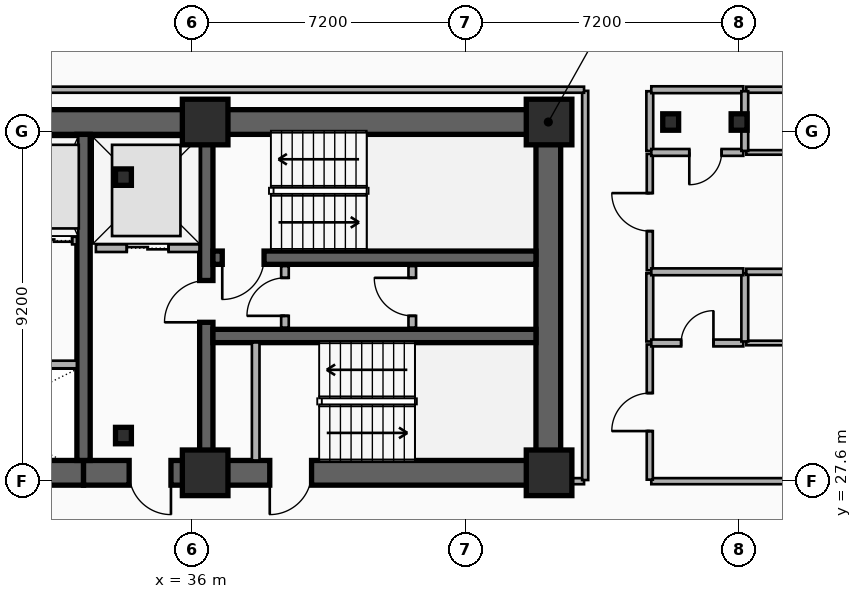
"""IFC4 building model, lengths in metres.
Left out: names, types, materials, properties, quantities, classifications, styles, units other than length and angle.
Written with IfcOpenShell. Run it as: python <this file> out.ifc"""

import sys

from ifc_helpers import new_model, si_unit, direction, frame, frame_2d, origin, origin_2d, place, context, subcontext, project, spatial, rectangle, i_section, extrude, element, fill, save


model = new_model("IFC4")
c1 = context("Model", 3, precision=1e-05, world=origin(), true_north=direction((0.0, 1.0)))
c2 = subcontext(c1, "Body", "Model", "MODEL_VIEW")
j1 = project(units=[si_unit("LENGTHUNIT", "METRE"), si_unit("PLANEANGLEUNIT", "RADIAN")], contexts=[c1])
p1 = place(None, origin())
s1 = spatial("IfcSite", under=j1, at=p1, CompositionType="ELEMENT")
p2 = place(p1, origin())
s2 = spatial("IfcBuilding", under=s1, at=p2, CompositionType="ELEMENT")
p3 = place(p2, frame((0.0, 0.0, 101.3)))
s3 = spatial("IfcBuildingStorey", under=s2, at=p3, CompositionType="ELEMENT", Elevation=101.3)
p4 = place(p3, frame((12.15, 37.05, 0.0), z_axis=(0.0, 0.0, 1.0), x_axis=(1.0, 0.0, 0.0)))
e1 = element("IfcWall", 1, at=p4, inside=s3, PredefinedType="SHEAR", context=c2, shape_type="SweptSolid", body=[
    extrude(rectangle(XDim=33.23, YDim=0.65, at=frame_2d((16.615, 0.0))), origin(), (0.0, 0.0, 1.0), 3.5),
])
p5 = place(p3, frame((33.15, 27.82, 0.0), z_axis=(0.0, 0.0, 1.0), x_axis=(-1.0, 0.0, 0.0)))
e2 = element("IfcWall", 2, at=p5, inside=s3, PredefinedType="SHEAR", context=c2, shape_type="SweptSolid", body=[
    extrude(rectangle(XDim=11.97, YDim=0.65, at=frame_2d((5.985, 0.0))), origin(), (0.0, 0.0, 1.0), 3.5),
])
p6 = place(p5, frame((6.1, 0.0, 0.0)))
e3 = element("IfcOpeningElement", 3, at=p6, cuts=e2, PredefinedType="OPENING", context=c2, shape_type="SweptSolid", body=[
    extrude(rectangle(XDim=1.6, YDim=2.2, at=frame_2d((0.8, 1.1))), frame((0.0, 0.335, 0.0), z_axis=(0.0, -1.0, 0.0), x_axis=(1.0, 0.0, 0.0)), (0.0, 0.0, 1.0), 0.67),
])
p7 = place(p3, frame((45.38, 27.82, 0.0), z_axis=(0.0, 0.0, 1.0), x_axis=(-1.0, 0.0, 0.0)))
e4 = element("IfcWall", 4, at=p7, inside=s3, PredefinedType="SHEAR", context=c2, shape_type="SweptSolid", body=[
    extrude(rectangle(XDim=12.23, YDim=0.65, at=frame_2d((6.115, 0.0))), origin(), (0.0, 0.0, 1.0), 3.5),
])
p8 = place(p7, frame((9.93, 0.0, 0.0)))
e5 = element("IfcOpeningElement", 5, at=p8, cuts=e4, PredefinedType="OPENING", context=c2, shape_type="SweptSolid", body=[
    extrude(rectangle(XDim=1.1, YDim=2.15, at=frame_2d((0.55, 1.075))), frame((0.0, 0.335, 0.0), z_axis=(0.0, -1.0, 0.0), x_axis=(1.0, 0.0, 0.0)), (0.0, 0.0, 1.0), 0.67),
])
p9 = place(p7, frame((6.23, 0.0, 0.0)))
e6 = element("IfcOpeningElement", 6, at=p9, cuts=e4, PredefinedType="OPENING", context=c2, shape_type="SweptSolid", body=[
    extrude(rectangle(XDim=1.1, YDim=2.15, at=frame_2d((0.55, 1.075))), frame((0.0, 0.335, 0.0), z_axis=(0.0, -1.0, 0.0), x_axis=(1.0, 0.0, 0.0)), (0.0, 0.0, 1.0), 0.67),
])
p10 = place(p3, frame((45.38, 28.145, 0.0), z_axis=(0.0, 0.0, 1.0), x_axis=(0.0, 1.0, 0.0)))
e7 = element("IfcWall", 7, at=p10, inside=s3, PredefinedType="SHEAR", context=c2, shape_type="SweptSolid", body=[
    extrude(rectangle(XDim=8.58, YDim=0.65, at=frame_2d((4.29, 0.0))), origin(), (0.0, 0.0, 1.0), 3.5),
])
p11 = place(p3, frame((33.15, 28.145, 0.0), z_axis=(0.0, 0.0, 1.0), x_axis=(0.0, 1.0, 0.0)))
e8 = element("IfcWall", 8, at=p11, inside=s3, PredefinedType="SHEAR", context=c2, shape_type="SweptSolid", body=[
    extrude(rectangle(XDim=8.58, YDim=0.35, at=frame_2d((4.29, 0.0))), origin(), (0.0, 0.0, 1.0), 3.5),
])
p12 = place(p3, frame((36.38, 28.145, 0.0), z_axis=(0.0, 0.0, 1.0), x_axis=(0.0, 1.0, 0.0)))
e9 = element("IfcWall", 9, at=p12, inside=s3, PredefinedType="SHEAR", context=c2, shape_type="SweptSolid", body=[
    extrude(rectangle(XDim=8.58, YDim=0.35, at=frame_2d((4.29, 0.0))), origin(), (0.0, 0.0, 1.0), 3.5),
])
p13 = place(p12, frame((3.635, 0.0, 0.0)))
e10 = element("IfcOpeningElement", 10, at=p13, cuts=e9, PredefinedType="OPENING", context=c2, shape_type="SweptSolid", body=[
    extrude(rectangle(XDim=1.1, YDim=2.15, at=frame_2d((0.55, 1.075))), frame((0.0, 0.185, 0.0), z_axis=(0.0, -1.0, 0.0), x_axis=(1.0, 0.0, 0.0)), (0.0, 0.0, 1.0), 0.37),
])
p14 = place(p3, frame((45.055, 33.48, 0.0), z_axis=(0.0, 0.0, 1.0), x_axis=(-1.0, 0.0, 0.0)))
e11 = element("IfcWall", 11, at=p14, inside=s3, PredefinedType="SHEAR", context=c2, shape_type="SweptSolid", body=[
    extrude(rectangle(XDim=8.5, YDim=0.35, at=frame_2d((4.25, 0.0))), origin(), (0.0, 0.0, 1.0), 3.5),
])
p15 = place(p14, frame((7.155, 0.0, 0.0)))
e12 = element("IfcOpeningElement", 12, at=p15, cuts=e11, PredefinedType="OPENING", context=c2, shape_type="SweptSolid", body=[
    extrude(rectangle(XDim=1.1, YDim=2.15, at=frame_2d((0.55, 1.075))), frame((0.0, 0.185, 0.0), z_axis=(0.0, -1.0, 0.0), x_axis=(1.0, 0.0, 0.0)), (0.0, 0.0, 1.0), 0.37),
])
p16 = place(p3, frame((36.555, 31.42, 0.0), z_axis=(0.0, 0.0, 1.0), x_axis=(1.0, 0.0, 0.0)))
e13 = element("IfcWall", 13, at=p16, inside=s3, PredefinedType="SHEAR", context=c2, shape_type="SweptSolid", body=[
    extrude(rectangle(XDim=8.5, YDim=0.35, at=frame_2d((4.25, 0.0))), origin(), (0.0, 0.0, 1.0), 3.5),
])
for number, where, z_axis, x_axis in (
    (14, (34.2, 28.8, 0.0), (0.0, 0.0, 1.0), (1.0, 0.0, 0.0)),
    (15, (34.2, 35.6, 0.0), (0.0, 0.0, 1.0), (1.0, 0.0, 0.0)),
):
    element("IfcColumn", number, at=place(p3, frame(where, z_axis=z_axis, x_axis=x_axis)), inside=s3, PredefinedType="COLUMN", context=c2, shape_type="SweptSolid", body=[
        extrude(i_section(OverallWidth=0.418, OverallDepth=0.432, WebThickness=0.035, FlangeThickness=0.056, FilletRadius=0.015, at=origin_2d()), origin(), (0.0, 0.0, 1.0), 3.5),
    ])
for number, where, z_axis, x_axis in (
    (16, (36.35, 27.82, 0.0), (0.0, 0.0, 1.0), (1.0, 0.0, 0.0)),
    (17, (36.35, 37.05, 0.0), (0.0, 0.0, 1.0), (1.0, 0.0, 0.0)),
    (18, (45.4, 27.82, 0.0), (0.0, 0.0, 1.0), (1.0, 0.0, 0.0)),
    (19, (45.4, 37.05, 0.0), (0.0, 0.0, 1.0), (1.0, 0.0, 0.0)),
):
    element("IfcColumn", number, at=place(p3, frame(where, z_axis=z_axis, x_axis=x_axis)), inside=s3, PredefinedType="COLUMN", context=c2, shape_type="SweptSolid", body=[
        extrude(rectangle(XDim=1.2, YDim=1.2, at=origin_2d()), origin(), (0.0, 0.0, 1.0), 3.5),
    ])
for number, where, z_axis, x_axis in (
    (20, (48.6, 37.05, 0.0), (0.0, 0.0, 1.0), (1.0, 0.0, 0.0)),
    (21, (50.4, 37.05, 0.0), (0.0, 0.0, 1.0), (1.0, 0.0, 0.0)),
):
    element("IfcColumn", number, at=place(p3, frame(where, z_axis=z_axis, x_axis=x_axis)), inside=s3, PredefinedType="COLUMN", context=c2, shape_type="SweptSolid", body=[
        extrude(i_section(OverallWidth=0.418, OverallDepth=0.432, WebThickness=0.035, FlangeThickness=0.056, FilletRadius=0.015, at=origin_2d()), origin(), (0.0, 0.0, 1.0), 3.5),
    ])
p17 = place(p3, frame((33.475, 33.73, 0.0), z_axis=(0.0, 0.0, 1.0), x_axis=(1.0, 0.0, 0.0)))
e22 = element("IfcWall", 22, at=p17, inside=s3, PredefinedType="PARTITIONING", context=c2, shape_type="SweptSolid", body=[
    extrude(rectangle(XDim=2.725, YDim=0.2, at=frame_2d((1.362, 0.0))), origin(), (0.0, 0.0, 1.0), 2.212),
])
p18 = place(p17, frame((0.812, 0.0, 0.0)))
e23 = element("IfcOpeningElement", 23, at=p18, cuts=e22, PredefinedType="OPENING", context=c2, shape_type="SweptSolid", body=[
    extrude(rectangle(XDim=1.1, YDim=2.15, at=frame_2d((0.55, 1.075))), frame((0.0, 0.11, 0.0), z_axis=(0.0, -1.0, 0.0), x_axis=(1.0, 0.0, 0.0)), (0.0, 0.0, 1.0), 0.22),
])
p19 = place(p3, frame((31.775, 30.67, 0.0), z_axis=(0.0, 0.0, 1.0), x_axis=(1.0, 0.0, 0.0)))
e24 = element("IfcWall", 24, at=p19, inside=s3, PredefinedType="PARTITIONING", context=c2, shape_type="SweptSolid", body=[
    extrude(rectangle(XDim=1.2, YDim=0.2, at=frame_2d((0.6, 0.0))), origin(), (0.0, 0.0, 1.0), 2.62),
])
p20 = place(p3, frame((31.775, 33.93, 0.0), z_axis=(0.0, 0.0, 1.0), x_axis=(1.0, 0.0, 0.0)))
e25 = element("IfcWall", 25, at=p20, inside=s3, PredefinedType="PARTITIONING", context=c2, shape_type="SweptSolid", body=[
    extrude(rectangle(XDim=1.2, YDim=0.2, at=frame_2d((0.6, 0.0))), origin(), (0.0, 0.0, 1.0), 3.24),
])
p21 = place(p20, frame((0.125, 0.0, 0.0)))
e26 = element("IfcOpeningElement", 26, at=p21, cuts=e25, PredefinedType="OPENING", context=c2, shape_type="SweptSolid", body=[
    extrude(rectangle(XDim=0.95, YDim=2.15, at=frame_2d((0.475, 1.075))), frame((0.0, 0.11, 0.0), z_axis=(0.0, -1.0, 0.0), x_axis=(1.0, 0.0, 0.0)), (0.0, 0.0, 1.0), 0.22),
])
p22 = place(p3, frame((37.68, 28.145, 0.0), z_axis=(0.0, 0.0, 1.0), x_axis=(0.0, 1.0, 0.0)))
e27 = element("IfcWall", 27, at=p22, inside=s3, PredefinedType="PARTITIONING", context=c2, shape_type="SweptSolid", body=[
    extrude(rectangle(XDim=3.105, YDim=0.2, at=frame_2d((1.552, 0.0))), origin(), (0.0, 0.0, 1.0), 2.62),
])
p23 = place(p3, frame((38.45, 31.64, 0.0), z_axis=(0.0, 0.0, 1.0), x_axis=(0.0, 1.0, 0.0)))
e28 = element("IfcWall", 28, at=p23, inside=s3, PredefinedType="PARTITIONING", context=c2, shape_type="SweptSolid", body=[
    extrude(rectangle(XDim=1.62, YDim=0.2, at=frame_2d((0.81, 0.0))), origin(), (0.0, 0.0, 1.0), 3.24),
])
p24 = place(p23, frame((0.31, 0.0, 0.0)))
e29 = element("IfcOpeningElement", 29, at=p24, cuts=e28, PredefinedType="OPENING", context=c2, shape_type="SweptSolid", body=[
    extrude(rectangle(XDim=1.0, YDim=2.15, at=frame_2d((0.5, 1.075))), frame((0.0, 0.11, 0.0), z_axis=(0.0, -1.0, 0.0), x_axis=(1.0, 0.0, 0.0)), (0.0, 0.0, 1.0), 0.22),
])
p25 = place(p3, frame((41.8, 31.64, 0.0), z_axis=(0.0, 0.0, 1.0), x_axis=(0.0, 1.0, 0.0)))
e30 = element("IfcWall", 30, at=p25, inside=s3, PredefinedType="PARTITIONING", context=c2, shape_type="SweptSolid", body=[
    extrude(rectangle(XDim=1.62, YDim=0.2, at=frame_2d((0.81, 0.0))), origin(), (0.0, 0.0, 1.0), 3.24),
])
p26 = place(p25, frame((0.31, 0.0, 0.0)))
e31 = element("IfcOpeningElement", 31, at=p26, cuts=e30, PredefinedType="OPENING", context=c2, shape_type="SweptSolid", body=[
    extrude(rectangle(XDim=1.0, YDim=2.15, at=frame_2d((0.5, 1.075))), frame((0.0, 0.11, 0.0), z_axis=(0.0, -1.0, 0.0), x_axis=(1.0, 0.0, 0.0)), (0.0, 0.0, 1.0), 0.22),
])
p27 = place(p3, frame((48.09, 27.6, 0.0), z_axis=(0.0, 0.0, 1.0), x_axis=(1.0, 0.0, 0.0)))
e32 = element("IfcWall", 32, at=p27, inside=s3, PredefinedType="PARTITIONING", context=c2, shape_type="SweptSolid", body=[
    extrude(rectangle(XDim=9.25, YDim=0.16, at=frame_2d((4.625, 0.0))), origin(), (0.0, 0.0, 1.0), 2.57),
])
p28 = place(p27, frame((4.125, 0.0, 0.0)))
e33 = element("IfcOpeningElement", 33, at=p28, cuts=e32, PredefinedType="OPENING", context=c2, shape_type="SweptSolid", body=[
    extrude(rectangle(XDim=1.0, YDim=2.15, at=frame_2d((0.5, 1.075))), frame((0.0, 0.09, 0.0), z_axis=(0.0, -1.0, 0.0), x_axis=(1.0, 0.0, 0.0)), (0.0, 0.0, 1.0), 0.18),
])
p29 = place(p3, frame((48.05, 27.64, 0.0), z_axis=(0.0, 0.0, 1.0), x_axis=(0.0, 1.0, 0.0)))
e34 = element("IfcWall", 34, at=p29, inside=s3, PredefinedType="PARTITIONING", context=c2, shape_type="SweptSolid", body=[
    extrude(rectangle(XDim=3.556, YDim=0.16, at=frame_2d((1.778, 0.0))), origin(), (0.0, 0.0, 1.0), 3.24),
])
p30 = place(p29, frame((1.278, 0.0, 0.0)))
e35 = element("IfcOpeningElement", 35, at=p30, cuts=e34, PredefinedType="OPENING", context=c2, shape_type="SweptSolid", body=[
    extrude(rectangle(XDim=1.0, YDim=2.15, at=frame_2d((0.5, 1.075))), frame((0.0, 0.09, 0.0), z_axis=(0.0, -1.0, 0.0), x_axis=(1.0, 0.0, 0.0)), (0.0, 0.0, 1.0), 0.18),
])
p31 = place(p3, frame((48.05, 31.276, 0.0), z_axis=(0.0, 0.0, 1.0), x_axis=(0.0, 1.0, 0.0)))
e36 = element("IfcWall", 36, at=p31, inside=s3, PredefinedType="PLUMBINGWALL", context=c2, shape_type="SweptSolid", body=[
    extrude(rectangle(XDim=1.793, YDim=0.18, at=frame_2d((0.896, 0.0))), origin(), (0.0, 0.0, 1.0), 3.24),
])
p32 = place(p3, frame((48.05, 33.149, 0.0), z_axis=(0.0, 0.0, 1.0), x_axis=(0.0, 1.0, 0.0)))
e37 = element("IfcWall", 37, at=p32, inside=s3, PredefinedType="PARTITIONING", context=c2, shape_type="SweptSolid", body=[
    extrude(rectangle(XDim=3.061, YDim=0.16, at=frame_2d((1.531, 0.0))), origin(), (0.0, 0.0, 1.0), 3.24),
])
p33 = place(p32, frame((1.031, 0.0, 0.0)))
e38 = element("IfcOpeningElement", 38, at=p33, cuts=e37, PredefinedType="OPENING", context=c2, shape_type="SweptSolid", body=[
    extrude(rectangle(XDim=1.0, YDim=2.15, at=frame_2d((0.5, 1.075))), frame((0.0, 0.09, 0.0), z_axis=(0.0, -1.0, 0.0), x_axis=(1.0, 0.0, 0.0)), (0.0, 0.0, 1.0), 0.18),
])
p34 = place(p3, frame((48.05, 36.29, 0.0), z_axis=(0.0, 0.0, 1.0), x_axis=(0.0, 1.0, 0.0)))
e39 = element("IfcWall", 39, at=p34, inside=s3, PredefinedType="PLUMBINGWALL", context=c2, shape_type="SweptSolid", body=[
    extrude(rectangle(XDim=1.57, YDim=0.18, at=frame_2d((0.785, 0.0))), origin(), (0.0, 0.0, 1.0), 2.72),
])
p35 = place(p3, frame((48.09, 37.9, 0.0), z_axis=(0.0, 0.0, 1.0), x_axis=(1.0, 0.0, 0.0)))
e40 = element("IfcWall", 40, at=p35, inside=s3, PredefinedType="PLUMBINGWALL", context=c2, shape_type="SweptSolid", body=[
    extrude(rectangle(XDim=2.42, YDim=0.18, at=frame_2d((1.21, 0.0))), origin(), (0.0, 0.0, 1.0), 3.24),
])
p36 = place(p3, frame((50.59, 37.9, 0.0), z_axis=(0.0, 0.0, 1.0), x_axis=(1.0, 0.0, 0.0)))
e41 = element("IfcWall", 41, at=p36, inside=s3, PredefinedType="PARTITIONING", context=c2, shape_type="SweptSolid", body=[
    extrude(rectangle(XDim=6.75, YDim=0.16, at=frame_2d((3.375, 0.0))), origin(), (0.0, 0.0, 1.0), 3.24),
])
p37 = place(p3, frame((48.09, 31.236, 0.0), z_axis=(0.0, 0.0, 1.0), x_axis=(1.0, 0.0, 0.0)))
e42 = element("IfcWall", 42, at=p37, inside=s3, PredefinedType="PLUMBINGWALL", context=c2, shape_type="SweptSolid", body=[
    extrude(rectangle(XDim=2.42, YDim=0.18, at=frame_2d((1.21, 0.0))), origin(), (0.0, 0.0, 1.0), 2.57),
])
p38 = place(p37, frame((0.785, 0.0, 0.0)))
e43 = element("IfcOpeningElement", 43, at=p38, cuts=e42, PredefinedType="OPENING", context=c2, shape_type="SweptSolid", body=[
    extrude(rectangle(XDim=0.85, YDim=2.1, at=frame_2d((0.425, 1.05))), frame((0.0, 0.1, 0.0), z_axis=(0.0, -1.0, 0.0), x_axis=(1.0, 0.0, 0.0)), (0.0, 0.0, 1.0), 0.2),
])
p39 = place(p3, frame((50.59, 31.236, 0.0), z_axis=(0.0, 0.0, 1.0), x_axis=(1.0, 0.0, 0.0)))
e44 = element("IfcWall", 44, at=p39, inside=s3, PredefinedType="PARTITIONING", context=c2, shape_type="SweptSolid", body=[
    extrude(rectangle(XDim=6.75, YDim=0.12, at=frame_2d((3.375, 0.0))), origin(), (0.0, 0.0, 1.0), 2.57),
])
p40 = place(p39, frame((2.925, 0.0, 0.0)))
e45 = element("IfcOpeningElement", 45, at=p40, cuts=e44, PredefinedType="OPENING", context=c2, shape_type="SweptSolid", body=[
    extrude(rectangle(XDim=0.9, YDim=2.1, at=frame_2d((0.45, 1.05))), frame((0.0, 0.07, 0.0), z_axis=(0.0, -1.0, 0.0), x_axis=(1.0, 0.0, 0.0)), (0.0, 0.0, 1.0), 0.14),
])
p41 = place(p3, frame((50.55, 31.276, 0.0), z_axis=(0.0, 0.0, 1.0), x_axis=(0.0, 1.0, 0.0)))
e46 = element("IfcWall", 46, at=p41, inside=s3, PredefinedType="PLUMBINGWALL", context=c2, shape_type="SweptSolid", body=[
    extrude(rectangle(XDim=1.793, YDim=0.18, at=frame_2d((0.896, 0.0))), origin(), (0.0, 0.0, 1.0), 2.57),
])
p42 = place(p3, frame((48.09, 33.109, 0.0), z_axis=(0.0, 0.0, 1.0), x_axis=(1.0, 0.0, 0.0)))
e47 = element("IfcWall", 47, at=p42, inside=s3, PredefinedType="PLUMBINGWALL", context=c2, shape_type="SweptSolid", body=[
    extrude(rectangle(XDim=2.42, YDim=0.18, at=frame_2d((1.21, 0.0))), origin(), (0.0, 0.0, 1.0), 2.57),
])
p43 = place(p3, frame((50.59, 33.109, 0.0), z_axis=(0.0, 0.0, 1.0), x_axis=(1.0, 0.0, 0.0)))
e48 = element("IfcWall", 48, at=p43, inside=s3, PredefinedType="PARTITIONING", context=c2, shape_type="SweptSolid", body=[
    extrude(rectangle(XDim=6.75, YDim=0.16, at=frame_2d((3.375, 0.0))), origin(), (0.0, 0.0, 1.0), 2.57),
])
p44 = place(p3, frame((50.51, 36.25, 0.0), z_axis=(0.0, 0.0, 1.0), x_axis=(-1.0, 0.0, 0.0)))
e49 = element("IfcWall", 49, at=p44, inside=s3, PredefinedType="PLUMBINGWALL", context=c2, shape_type="SweptSolid", body=[
    extrude(rectangle(XDim=2.42, YDim=0.18, at=frame_2d((1.21, 0.0))), origin(), (0.0, 0.0, 1.0), 2.57),
])
p45 = place(p44, frame((0.57, 0.0, 0.0)))
e50 = element("IfcOpeningElement", 50, at=p45, cuts=e49, PredefinedType="OPENING", context=c2, shape_type="SweptSolid", body=[
    extrude(rectangle(XDim=0.85, YDim=2.1, at=frame_2d((0.425, 1.05))), frame((0.0, 0.1, 0.0), z_axis=(0.0, -1.0, 0.0), x_axis=(1.0, 0.0, 0.0)), (0.0, 0.0, 1.0), 0.2),
])
p46 = place(p3, frame((50.59, 36.25, 0.0), z_axis=(0.0, 0.0, 1.0), x_axis=(1.0, 0.0, 0.0)))
e51 = element("IfcWall", 51, at=p46, inside=s3, PredefinedType="PARTITIONING", context=c2, shape_type="SweptSolid", body=[
    extrude(rectangle(XDim=6.75, YDim=0.12, at=frame_2d((3.375, 0.0))), origin(), (0.0, 0.0, 1.0), 2.57),
])
p47 = place(p46, frame((2.925, 0.0, 0.0)))
e52 = element("IfcOpeningElement", 52, at=p47, cuts=e51, PredefinedType="OPENING", context=c2, shape_type="SweptSolid", body=[
    extrude(rectangle(XDim=0.9, YDim=2.1, at=frame_2d((0.45, 1.05))), frame((0.0, 0.07, 0.0), z_axis=(0.0, -1.0, 0.0), x_axis=(1.0, 0.0, 0.0)), (0.0, 0.0, 1.0), 0.14),
])
p48 = place(p3, frame((50.55, 36.29, 0.0), z_axis=(0.0, 0.0, 1.0), x_axis=(0.0, 1.0, 0.0)))
e53 = element("IfcWall", 53, at=p48, inside=s3, PredefinedType="PLUMBINGWALL", context=c2, shape_type="SweptSolid", body=[
    extrude(rectangle(XDim=1.57, YDim=0.18, at=frame_2d((0.785, 0.0))), origin(), (0.0, 0.0, 1.0), 2.57),
])
p49 = place(p3, frame((45.41, 27.6, 0.0), z_axis=(0.0, 0.0, 1.0), x_axis=(1.0, 0.0, 0.0)))
e54 = element("IfcWall", 54, at=p49, inside=s3, PredefinedType="PARTITIONING", context=c2, shape_type="SweptSolid", body=[
    extrude(rectangle(XDim=0.91, YDim=0.16, at=frame_2d((0.455, 0.0))), origin(), (0.0, 0.0, 1.0), 2.28),
])
p50 = place(p3, frame((46.35, 27.63, 0.0), z_axis=(0.0, 0.0, 1.0), x_axis=(0.0, 1.0, 0.0)))
e55 = element("IfcWall", 55, at=p50, inside=s3, PredefinedType="PARTITIONING", context=c2, shape_type="SweptSolid", body=[
    extrude(rectangle(XDim=10.24, YDim=0.16, at=frame_2d((5.12, 0.0))), origin(), (0.0, 0.0, 1.0), 2.72),
])
p51 = place(p3, frame((11.28, 37.9, 0.0), z_axis=(0.0, 0.0, 1.0), x_axis=(1.0, 0.0, 0.0)))
e56 = element("IfcWall", 56, at=p51, inside=s3, PredefinedType="PARTITIONING", context=c2, shape_type="SweptSolid", body=[
    extrude(rectangle(XDim=35.04, YDim=0.16, at=frame_2d((17.52, 0.0))), origin(), (0.0, 0.0, 1.0), 3.24),
])
p52 = place(p18, origin())
e57 = element("IfcDoor", 57, at=p52, inside=s3, OperationType="DOUBLE_DOOR_SLIDING", PredefinedType="DOOR", context=c2, shape_type="SweptSolid", body=[
    extrude(rectangle(XDim=1.1, YDim=2.15, at=frame_2d((0.55, 1.075))), frame((0.0, 0.025, 0.0), z_axis=(0.0, -1.0, 0.0), x_axis=(1.0, 0.0, 0.0)), (0.0, 0.0, 1.0), 0.05),
])
fill(e23, e57)
p53 = place(p21, origin())
e58 = element("IfcDoor", 58, at=p53, inside=s3, OperationType="DOUBLE_DOOR_SLIDING", PredefinedType="DOOR", context=c2, shape_type="SweptSolid", body=[
    extrude(rectangle(XDim=0.95, YDim=2.15, at=frame_2d((0.475, 1.075))), frame((0.0, 0.025, 0.0), z_axis=(0.0, -1.0, 0.0), x_axis=(1.0, 0.0, 0.0)), (0.0, 0.0, 1.0), 0.05),
])
fill(e26, e58)
p54 = place(p15, origin())
e59 = element("IfcDoor", 59, at=p54, inside=s3, OperationType="SINGLE_SWING_RIGHT", PredefinedType="DOOR", context=c2, shape_type="SweptSolid", body=[
    extrude(rectangle(XDim=1.1, YDim=2.15, at=frame_2d((0.55, 1.075))), frame((0.0, 0.025, 0.0), z_axis=(0.0, -1.0, 0.0), x_axis=(1.0, 0.0, 0.0)), (0.0, 0.0, 1.0), 0.05),
])
fill(e12, e59)
p55 = place(p13, origin())
e60 = element("IfcDoor", 60, at=p55, inside=s3, OperationType="SINGLE_SWING_LEFT", PredefinedType="DOOR", context=c2, shape_type="SweptSolid", body=[
    extrude(rectangle(XDim=1.1, YDim=2.15, at=frame_2d((0.55, 1.075))), frame((0.0, 0.025, 0.0), z_axis=(0.0, -1.0, 0.0), x_axis=(1.0, 0.0, 0.0)), (0.0, 0.0, 1.0), 0.05),
])
fill(e10, e60)
p56 = place(p8, origin())
e61 = element("IfcDoor", 61, at=p56, inside=s3, OperationType="SINGLE_SWING_LEFT", PredefinedType="DOOR", context=c2, shape_type="SweptSolid", body=[
    extrude(rectangle(XDim=1.1, YDim=2.15, at=frame_2d((0.55, 1.075))), frame((0.0, 0.025, 0.0), z_axis=(0.0, -1.0, 0.0), x_axis=(1.0, 0.0, 0.0)), (0.0, 0.0, 1.0), 0.05),
])
fill(e5, e61)
p57 = place(p9, origin())
e62 = element("IfcDoor", 62, at=p57, inside=s3, OperationType="SINGLE_SWING_RIGHT", PredefinedType="DOOR", context=c2, shape_type="SweptSolid", body=[
    extrude(rectangle(XDim=1.1, YDim=2.15, at=frame_2d((0.55, 1.075))), frame((0.0, 0.025, 0.0), z_axis=(0.0, -1.0, 0.0), x_axis=(1.0, 0.0, 0.0)), (0.0, 0.0, 1.0), 0.05),
])
fill(e6, e62)
p58 = place(p24, origin())
e63 = element("IfcDoor", 63, at=p58, inside=s3, OperationType="SINGLE_SWING_LEFT", PredefinedType="DOOR", context=c2, shape_type="SweptSolid", body=[
    extrude(rectangle(XDim=1.0, YDim=2.15, at=frame_2d((0.5, 1.075))), frame((0.0, 0.025, 0.0), z_axis=(0.0, -1.0, 0.0), x_axis=(1.0, 0.0, 0.0)), (0.0, 0.0, 1.0), 0.05),
])
fill(e29, e63)
p59 = place(p26, origin())
e64 = element("IfcDoor", 64, at=p59, inside=s3, OperationType="SINGLE_SWING_RIGHT", PredefinedType="DOOR", context=c2, shape_type="SweptSolid", body=[
    extrude(rectangle(XDim=1.0, YDim=2.15, at=frame_2d((0.5, 1.075))), frame((0.0, 0.025, 0.0), z_axis=(0.0, -1.0, 0.0), x_axis=(1.0, 0.0, 0.0)), (0.0, 0.0, 1.0), 0.05),
])
fill(e31, e64)
p60 = place(p30, origin())
e65 = element("IfcDoor", 65, at=p60, inside=s3, OperationType="SINGLE_SWING_LEFT", PredefinedType="DOOR", context=c2, shape_type="SweptSolid", body=[
    extrude(rectangle(XDim=1.0, YDim=2.15, at=frame_2d((0.5, 1.075))), frame((0.0, 0.025, 0.0), z_axis=(0.0, -1.0, 0.0), x_axis=(1.0, 0.0, 0.0)), (0.0, 0.0, 1.0), 0.05),
])
fill(e35, e65)
p61 = place(p33, origin())
e66 = element("IfcDoor", 66, at=p61, inside=s3, OperationType="SINGLE_SWING_RIGHT", PredefinedType="DOOR", context=c2, shape_type="SweptSolid", body=[
    extrude(rectangle(XDim=1.0, YDim=2.15, at=frame_2d((0.5, 1.075))), frame((0.0, 0.025, 0.0), z_axis=(0.0, -1.0, 0.0), x_axis=(1.0, 0.0, 0.0)), (0.0, 0.0, 1.0), 0.05),
])
fill(e38, e66)
p62 = place(p38, origin())
e67 = element("IfcDoor", 67, at=p62, inside=s3, OperationType="SINGLE_SWING_RIGHT", PredefinedType="DOOR", context=c2, shape_type="SweptSolid", body=[
    extrude(rectangle(XDim=0.85, YDim=2.1, at=frame_2d((0.425, 1.05))), frame((0.0, 0.025, 0.0), z_axis=(0.0, -1.0, 0.0), x_axis=(1.0, 0.0, 0.0)), (0.0, 0.0, 1.0), 0.05),
])
fill(e43, e67)
p63 = place(p45, origin())
e68 = element("IfcDoor", 68, at=p63, inside=s3, OperationType="SINGLE_SWING_RIGHT", PredefinedType="DOOR", context=c2, shape_type="SweptSolid", body=[
    extrude(rectangle(XDim=0.85, YDim=2.1, at=frame_2d((0.425, 1.05))), frame((0.0, 0.025, 0.0), z_axis=(0.0, -1.0, 0.0), x_axis=(1.0, 0.0, 0.0)), (0.0, 0.0, 1.0), 0.05),
])
fill(e50, e68)
save(model, sys.argv[1])
